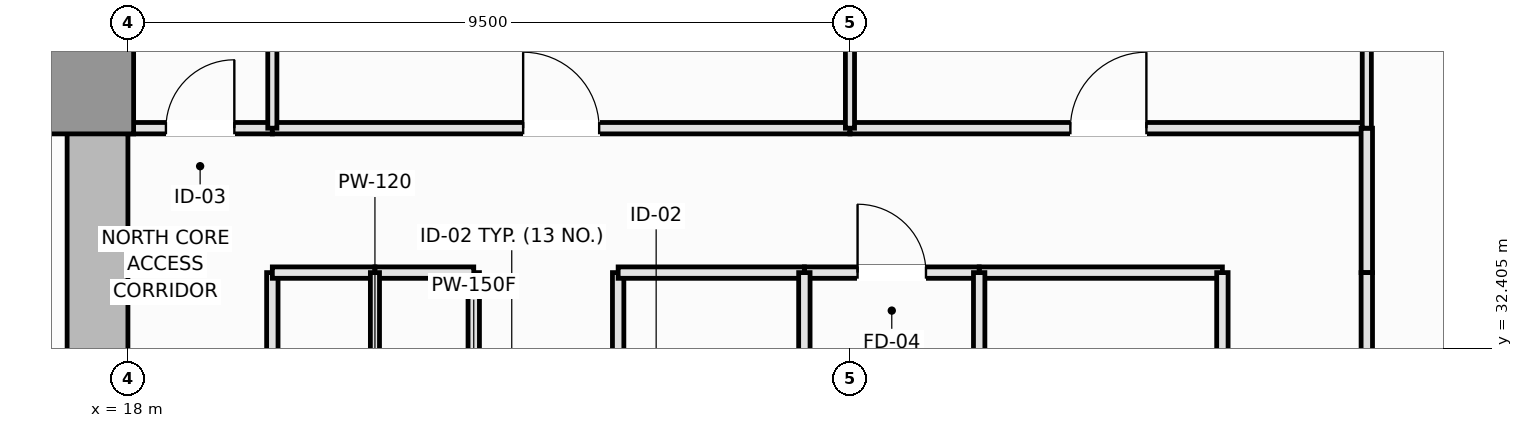
"""IFC4 building model, lengths in metres.
Left out: names, types, materials, properties, quantities, classifications, styles, units other than length and angle.
Written with IfcOpenShell. Run it as: python <this file> out.ifc"""

import sys

from ifc_helpers import new_model, si_unit, direction, frame, frame_2d, origin, origin_2d, place, context, subcontext, project, spatial, rectangle, extrude, element, fill, save


model = new_model("IFC4")
c1 = context("Model", 3, precision=1e-05, world=origin(), true_north=direction((0.0, 1.0)))
c2 = subcontext(c1, "Body", "Model", "MODEL_VIEW")
j1 = project(units=[si_unit("LENGTHUNIT", "METRE"), si_unit("PLANEANGLEUNIT", "RADIAN")], contexts=[c1])
p1 = place(None, origin())
s1 = spatial("IfcSite", under=j1, at=p1, CompositionType="ELEMENT")
p2 = place(p1, origin())
s2 = spatial("IfcBuilding", under=s1, at=p2, CompositionType="ELEMENT")
p3 = place(p2, frame((0.0, 0.0, 36.25)))
s3 = spatial("IfcBuildingStorey", under=s2, at=p3, CompositionType="ELEMENT", Elevation=36.25)
p4 = place(p3, frame((4.5, 36.1, 0.0), z_axis=(0.0, 0.0, 1.0), x_axis=(1.0, 0.0, 0.0)))
e1 = element("IfcWall", 1, at=p4, inside=s3, PredefinedType="SHEAR", context=c2, shape_type="SweptSolid", body=[
    extrude(rectangle(XDim=13.5, YDim=0.8, at=frame_2d((6.75, 0.0))), origin(), (0.0, 0.0, 1.0), 3.55),
])
p5 = place(p3, frame((17.6, 27.05, 0.0), z_axis=(0.0, 0.0, 1.0), x_axis=(0.0, 1.0, 0.0)))
e2 = element("IfcWall", 2, at=p5, inside=s3, PredefinedType="SHEAR", context=c2, shape_type="SweptSolid", body=[
    extrude(rectangle(XDim=8.65, YDim=0.8, at=frame_2d((4.325, 0.0))), origin(), (0.0, 0.0, 1.0), 3.55),
])
p6 = place(p5, frame((3.45, 0.0, 0.0)))
e3 = element("IfcOpeningElement", 3, at=p6, cuts=e2, PredefinedType="OPENING", context=c2, shape_type="SweptSolid", body=[
    extrude(rectangle(XDim=1.1, YDim=2.15, at=frame_2d((0.55, 1.075))), frame((0.0, 0.41, 0.0), z_axis=(0.0, -1.0, 0.0), x_axis=(1.0, 0.0, 0.0)), (0.0, 0.0, 1.0), 0.82),
])
p7 = place(p3, frame((17.4, 35.9, 0.0), z_axis=(0.0, 0.0, 1.0), x_axis=(1.0, 0.0, 0.0)))
e4 = element("IfcColumn", 4, at=p7, inside=s3, PredefinedType="PILASTER", context=c2, shape_type="SweptSolid", body=[
    extrude(rectangle(XDim=1.35, YDim=1.35, at=origin_2d()), origin(), (0.0, 0.0, 1.0), 3.55),
])
p8 = place(p3, frame((22.55, 29.75, 0.0), z_axis=(0.0, 0.0, 1.0), x_axis=(0.0, 1.0, 0.0)))
e5 = element("IfcWall", 5, at=p8, inside=s3, PredefinedType="PARTITIONING", context=c2, shape_type="SweptSolid", body=[
    extrude(rectangle(XDim=3.65, YDim=0.15, at=frame_2d((1.825, 0.0))), origin(), (0.0, 0.0, 1.0), 3.01),
])
p9 = place(p8, frame((1.325, 0.0, 0.0)))
e6 = element("IfcOpeningElement", 6, at=p9, cuts=e5, PredefinedType="OPENING", context=c2, shape_type="SweptSolid", body=[
    extrude(rectangle(XDim=1.0, YDim=2.15, at=frame_2d((0.5, 1.075))), frame((0.0, 0.085, 0.0), z_axis=(0.0, -1.0, 0.0), x_axis=(1.0, 0.0, 0.0)), (0.0, 0.0, 1.0), 0.17),
])
p10 = place(p3, frame((24.45, 30.3, 0.0), z_axis=(0.0, 0.0, 1.0), x_axis=(0.0, 1.0, 0.0)))
e7 = element("IfcWall", 7, at=p10, inside=s3, PredefinedType="PARTITIONING", context=c2, shape_type="SweptSolid", body=[
    extrude(rectangle(XDim=3.1, YDim=0.15, at=frame_2d((1.55, 0.0))), origin(), (0.0, 0.0, 1.0), 3.37),
])
p11 = place(p10, frame((1.05, 0.0, 0.0)))
e8 = element("IfcOpeningElement", 8, at=p11, cuts=e7, PredefinedType="OPENING", context=c2, shape_type="SweptSolid", body=[
    extrude(rectangle(XDim=1.0, YDim=2.15, at=frame_2d((0.5, 1.075))), frame((0.0, 0.085, 0.0), z_axis=(0.0, -1.0, 0.0), x_axis=(1.0, 0.0, 0.0)), (0.0, 0.0, 1.0), 0.17),
])
p12 = place(p3, frame((19.9, 29.75, 0.0), z_axis=(0.0, 0.0, 1.0), x_axis=(0.0, 1.0, 0.0)))
e9 = element("IfcWall", 9, at=p12, inside=s3, PredefinedType="PARTITIONING", context=c2, shape_type="SweptSolid", body=[
    extrude(rectangle(XDim=3.65, YDim=0.15, at=frame_2d((1.825, 0.0))), origin(), (0.0, 0.0, 1.0), 3.37),
])
p13 = place(p12, frame((1.325, 0.0, 0.0)))
e10 = element("IfcOpeningElement", 10, at=p13, cuts=e9, PredefinedType="OPENING", context=c2, shape_type="SweptSolid", body=[
    extrude(rectangle(XDim=1.0, YDim=2.15, at=frame_2d((0.5, 1.075))), frame((0.0, 0.085, 0.0), z_axis=(0.0, -1.0, 0.0), x_axis=(1.0, 0.0, 0.0)), (0.0, 0.0, 1.0), 0.17),
])
p14 = place(p3, frame((19.9, 33.4, 0.0), z_axis=(0.0, 0.0, 1.0), x_axis=(1.0, 0.0, 0.0)))
e11 = element("IfcWall", 11, at=p14, inside=s3, PredefinedType="PARTITIONING", context=c2, shape_type="SweptSolid", body=[
    extrude(rectangle(XDim=1.35, YDim=0.15, at=frame_2d((0.675, 0.0))), origin(), (0.0, 0.0, 1.0), 3.37),
])
p15 = place(p3, frame((21.25, 33.4, 0.0), z_axis=(0.0, 0.0, 1.0), x_axis=(1.0, 0.0, 0.0)))
e12 = element("IfcWall", 12, at=p15, inside=s3, PredefinedType="PARTITIONING", context=c2, shape_type="SweptSolid", body=[
    extrude(rectangle(XDim=1.3, YDim=0.15, at=frame_2d((0.65, 0.0))), origin(), (0.0, 0.0, 1.0), 3.37),
])
p16 = place(p3, frame((29.2, 33.4, 0.0), z_axis=(0.0, 0.0, 1.0), x_axis=(1.0, 0.0, 0.0)))
e13 = element("IfcWall", 13, at=p16, inside=s3, PredefinedType="PLUMBINGWALL", context=c2, shape_type="SweptSolid", body=[
    extrude(rectangle(XDim=3.2, YDim=0.15, at=frame_2d((1.6, 0.0))), origin(), (0.0, 0.0, 1.0), 3.37),
])
p17 = place(p3, frame((26.9, 33.4, 0.0), z_axis=(0.0, 0.0, 1.0), x_axis=(1.0, 0.0, 0.0)))
e14 = element("IfcWall", 14, at=p17, inside=s3, PredefinedType="PLUMBINGWALL", context=c2, shape_type="SweptSolid", body=[
    extrude(rectangle(XDim=2.3, YDim=0.15, at=frame_2d((1.15, 0.0))), origin(), (0.0, 0.0, 1.0), 3.37),
])
p18 = place(p17, frame((0.7, 0.0, 0.0)))
e15 = element("IfcOpeningElement", 15, at=p18, cuts=e14, PredefinedType="OPENING", context=c2, shape_type="SweptSolid", body=[
    extrude(rectangle(XDim=0.9, YDim=2.1, at=frame_2d((0.45, 1.05))), frame((0.0, 0.085, 0.0), z_axis=(0.0, -1.0, 0.0), x_axis=(1.0, 0.0, 0.0)), (0.0, 0.0, 1.0), 0.17),
])
p19 = place(p3, frame((24.45, 33.4, 0.0), z_axis=(0.0, 0.0, 1.0), x_axis=(1.0, 0.0, 0.0)))
e16 = element("IfcWall", 16, at=p19, inside=s3, PredefinedType="PARTITIONING", context=c2, shape_type="SweptSolid", body=[
    extrude(rectangle(XDim=2.45, YDim=0.15, at=frame_2d((1.225, 0.0))), origin(), (0.0, 0.0, 1.0), 3.37),
])
p20 = place(p3, frame((18.0, 35.3, 0.0), z_axis=(0.0, 0.0, 1.0), x_axis=(1.0, 0.0, 0.0)))
e17 = element("IfcWall", 17, at=p20, inside=s3, PredefinedType="PARTITIONING", context=c2, shape_type="SweptSolid", body=[
    extrude(rectangle(XDim=1.9, YDim=0.15, at=frame_2d((0.95, 0.0))), origin(), (0.0, 0.0, 1.0), 3.37),
])
p21 = place(p20, frame((0.5, 0.0, 0.0)))
e18 = element("IfcOpeningElement", 18, at=p21, cuts=e17, PredefinedType="OPENING", context=c2, shape_type="SweptSolid", body=[
    extrude(rectangle(XDim=0.9, YDim=2.1, at=frame_2d((0.45, 1.05))), frame((0.0, 0.085, 0.0), z_axis=(0.0, -1.0, 0.0), x_axis=(1.0, 0.0, 0.0)), (0.0, 0.0, 1.0), 0.17),
])
p22 = place(p3, frame((19.9, 35.3, 0.0), z_axis=(0.0, 0.0, 1.0), x_axis=(1.0, 0.0, 0.0)))
e19 = element("IfcWall", 19, at=p22, inside=s3, PredefinedType="PARTITIONING", context=c2, shape_type="SweptSolid", body=[
    extrude(rectangle(XDim=7.6, YDim=0.15, at=frame_2d((3.8, 0.0))), origin(), (0.0, 0.0, 1.0), 3.37),
])
p23 = place(p22, frame((3.3, 0.0, 0.0)))
e20 = element("IfcOpeningElement", 20, at=p23, cuts=e19, PredefinedType="OPENING", context=c2, shape_type="SweptSolid", body=[
    extrude(rectangle(XDim=1.0, YDim=2.15, at=frame_2d((0.5, 1.075))), frame((0.0, 0.085, 0.0), z_axis=(0.0, -1.0, 0.0), x_axis=(1.0, 0.0, 0.0)), (0.0, 0.0, 1.0), 0.17),
])
p24 = place(p3, frame((27.5, 35.3, 0.0), z_axis=(0.0, 0.0, 1.0), x_axis=(1.0, 0.0, 0.0)))
e21 = element("IfcWall", 21, at=p24, inside=s3, PredefinedType="PARTITIONING", context=c2, shape_type="SweptSolid", body=[
    extrude(rectangle(XDim=6.8, YDim=0.15, at=frame_2d((3.4, 0.0))), origin(), (0.0, 0.0, 1.0), 3.37),
])
p25 = place(p24, frame((2.9, 0.0, 0.0)))
e22 = element("IfcOpeningElement", 22, at=p25, cuts=e21, PredefinedType="OPENING", context=c2, shape_type="SweptSolid", body=[
    extrude(rectangle(XDim=1.0, YDim=2.15, at=frame_2d((0.5, 1.075))), frame((0.0, 0.085, 0.0), z_axis=(0.0, -1.0, 0.0), x_axis=(1.0, 0.0, 0.0)), (0.0, 0.0, 1.0), 0.17),
])
p26 = place(p3, frame((34.3, 33.4, 0.0), z_axis=(0.0, 0.0, 1.0), x_axis=(0.0, 1.0, 0.0)))
e23 = element("IfcWall", 23, at=p26, inside=s3, PredefinedType="PARTITIONING", context=c2, shape_type="SweptSolid", body=[
    extrude(rectangle(XDim=1.9, YDim=0.15, at=frame_2d((0.95, 0.0))), origin(), (0.0, 0.0, 1.0), 3.37),
])
p27 = place(p3, frame((32.4, 30.3, 0.0), z_axis=(0.0, 0.0, 1.0), x_axis=(0.0, 1.0, 0.0)))
e24 = element("IfcWall", 24, at=p27, inside=s3, PredefinedType="PLUMBINGWALL", context=c2, shape_type="SweptSolid", body=[
    extrude(rectangle(XDim=3.1, YDim=0.15, at=frame_2d((1.55, 0.0))), origin(), (0.0, 0.0, 1.0), 3.37),
])
p28 = place(p27, frame((1.1, 0.0, 0.0)))
e25 = element("IfcOpeningElement", 25, at=p28, cuts=e24, PredefinedType="OPENING", context=c2, shape_type="SweptSolid", body=[
    extrude(rectangle(XDim=0.9, YDim=2.1, at=frame_2d((0.45, 1.05))), frame((0.0, 0.085, 0.0), z_axis=(0.0, -1.0, 0.0), x_axis=(1.0, 0.0, 0.0)), (0.0, 0.0, 1.0), 0.17),
])
p29 = place(p3, frame((34.3, 25.25, 0.0), z_axis=(0.0, 0.0, 1.0), x_axis=(0.0, 1.0, 0.0)))
e26 = element("IfcWall", 26, at=p29, inside=s3, PredefinedType="PARTITIONING", context=c2, shape_type="SweptSolid", body=[
    extrude(rectangle(XDim=8.15, YDim=0.15, at=frame_2d((4.075, 0.0))), origin(), (0.0, 0.0, 1.0), 3.37),
])
p30 = place(p29, frame((3.575, 0.0, 0.0)))
e27 = element("IfcOpeningElement", 27, at=p30, cuts=e26, PredefinedType="OPENING", context=c2, shape_type="SweptSolid", body=[
    extrude(rectangle(XDim=1.0, YDim=2.15, at=frame_2d((0.5, 1.075))), frame((0.0, 0.085, 0.0), z_axis=(0.0, -1.0, 0.0), x_axis=(1.0, 0.0, 0.0)), (0.0, 0.0, 1.0), 0.17),
])
p31 = place(p3, frame((21.25, 29.75, 0.0), z_axis=(0.0, 0.0, 1.0), x_axis=(0.0, 1.0, 0.0)))
e28 = element("IfcWall", 28, at=p31, inside=s3, PredefinedType="PARTITIONING", context=c2, shape_type="SweptSolid", body=[
    extrude(rectangle(XDim=3.65, YDim=0.12, at=frame_2d((1.825, 0.0))), origin(), (0.0, 0.0, 1.0), 3.37),
])
for number, where, z_axis, x_axis in (
    (29, (29.2, 30.3, 0.0), (0.0, 0.0, 1.0), (0.0, 1.0, 0.0)),
    (30, (26.9, 30.3, 0.0), (0.0, 0.0, 1.0), (0.0, 1.0, 0.0)),
):
    element("IfcWall", number, at=place(p3, frame(where, z_axis=z_axis, x_axis=x_axis)), inside=s3, PredefinedType="PLUMBINGWALL", context=c2, shape_type="SweptSolid", body=[
        extrude(rectangle(XDim=3.1, YDim=0.15, at=frame_2d((1.55, 0.0))), origin(), (0.0, 0.0, 1.0), 3.37),
    ])
p32 = place(p3, frame((19.9, 35.3, 0.0), z_axis=(0.0, 0.0, 1.0), x_axis=(0.0, 1.0, 0.0)))
e31 = element("IfcWall", 31, at=p32, inside=s3, PredefinedType="PARTITIONING", context=c2, shape_type="SweptSolid", body=[
    extrude(rectangle(XDim=12.69, YDim=0.12, at=frame_2d((6.345, 0.0))), origin(), (0.0, 0.0, 1.0), 3.37),
])
p33 = place(p3, frame((27.5, 35.3, 0.0), z_axis=(0.0, 0.0, 1.0), x_axis=(0.0, 1.0, 0.0)))
e32 = element("IfcWall", 32, at=p33, inside=s3, PredefinedType="PARTITIONING", context=c2, shape_type="SweptSolid", body=[
    extrude(rectangle(XDim=12.69, YDim=0.12, at=frame_2d((6.345, 0.0))), origin(), (0.0, 0.0, 1.0), 2.82),
])
p34 = place(p3, frame((34.3, 35.3, 0.0), z_axis=(0.0, 0.0, 1.0), x_axis=(0.0, 1.0, 0.0)))
e33 = element("IfcWall", 33, at=p34, inside=s3, PredefinedType="PARTITIONING", context=c2, shape_type="SweptSolid", body=[
    extrude(rectangle(XDim=12.69, YDim=0.12, at=frame_2d((6.345, 0.0))), origin(), (0.0, 0.0, 1.0), 3.37),
])
p35 = place(p18, origin())
e34 = element("IfcDoor", 34, at=p35, inside=s3, OperationType="SINGLE_SWING_LEFT", PredefinedType="DOOR", context=c2, shape_type="SweptSolid", body=[
    extrude(rectangle(XDim=0.9, YDim=2.1, at=frame_2d((0.45, 1.05))), frame((0.0, 0.025, 0.0), z_axis=(0.0, -1.0, 0.0), x_axis=(1.0, 0.0, 0.0)), (0.0, 0.0, 1.0), 0.05),
])
fill(e15, e34)
p36 = place(p21, origin())
e35 = element("IfcDoor", 35, at=p36, inside=s3, OperationType="SINGLE_SWING_RIGHT", PredefinedType="DOOR", context=c2, shape_type="SweptSolid", body=[
    extrude(rectangle(XDim=0.9, YDim=2.1, at=frame_2d((0.45, 1.05))), frame((0.0, 0.025, 0.0), z_axis=(0.0, -1.0, 0.0), x_axis=(1.0, 0.0, 0.0)), (0.0, 0.0, 1.0), 0.05),
])
fill(e18, e35)
p37 = place(p23, origin())
e36 = element("IfcDoor", 36, at=p37, inside=s3, OperationType="SINGLE_SWING_LEFT", PredefinedType="DOOR", context=c2, shape_type="SweptSolid", body=[
    extrude(rectangle(XDim=1.0, YDim=2.15, at=frame_2d((0.5, 1.075))), frame((0.0, 0.025, 0.0), z_axis=(0.0, -1.0, 0.0), x_axis=(1.0, 0.0, 0.0)), (0.0, 0.0, 1.0), 0.05),
])
fill(e20, e36)
p38 = place(p25, origin())
e37 = element("IfcDoor", 37, at=p38, inside=s3, OperationType="SINGLE_SWING_RIGHT", PredefinedType="DOOR", context=c2, shape_type="SweptSolid", body=[
    extrude(rectangle(XDim=1.0, YDim=2.15, at=frame_2d((0.5, 1.075))), frame((0.0, 0.025, 0.0), z_axis=(0.0, -1.0, 0.0), x_axis=(1.0, 0.0, 0.0)), (0.0, 0.0, 1.0), 0.05),
])
fill(e22, e37)
save(model, sys.argv[1])
